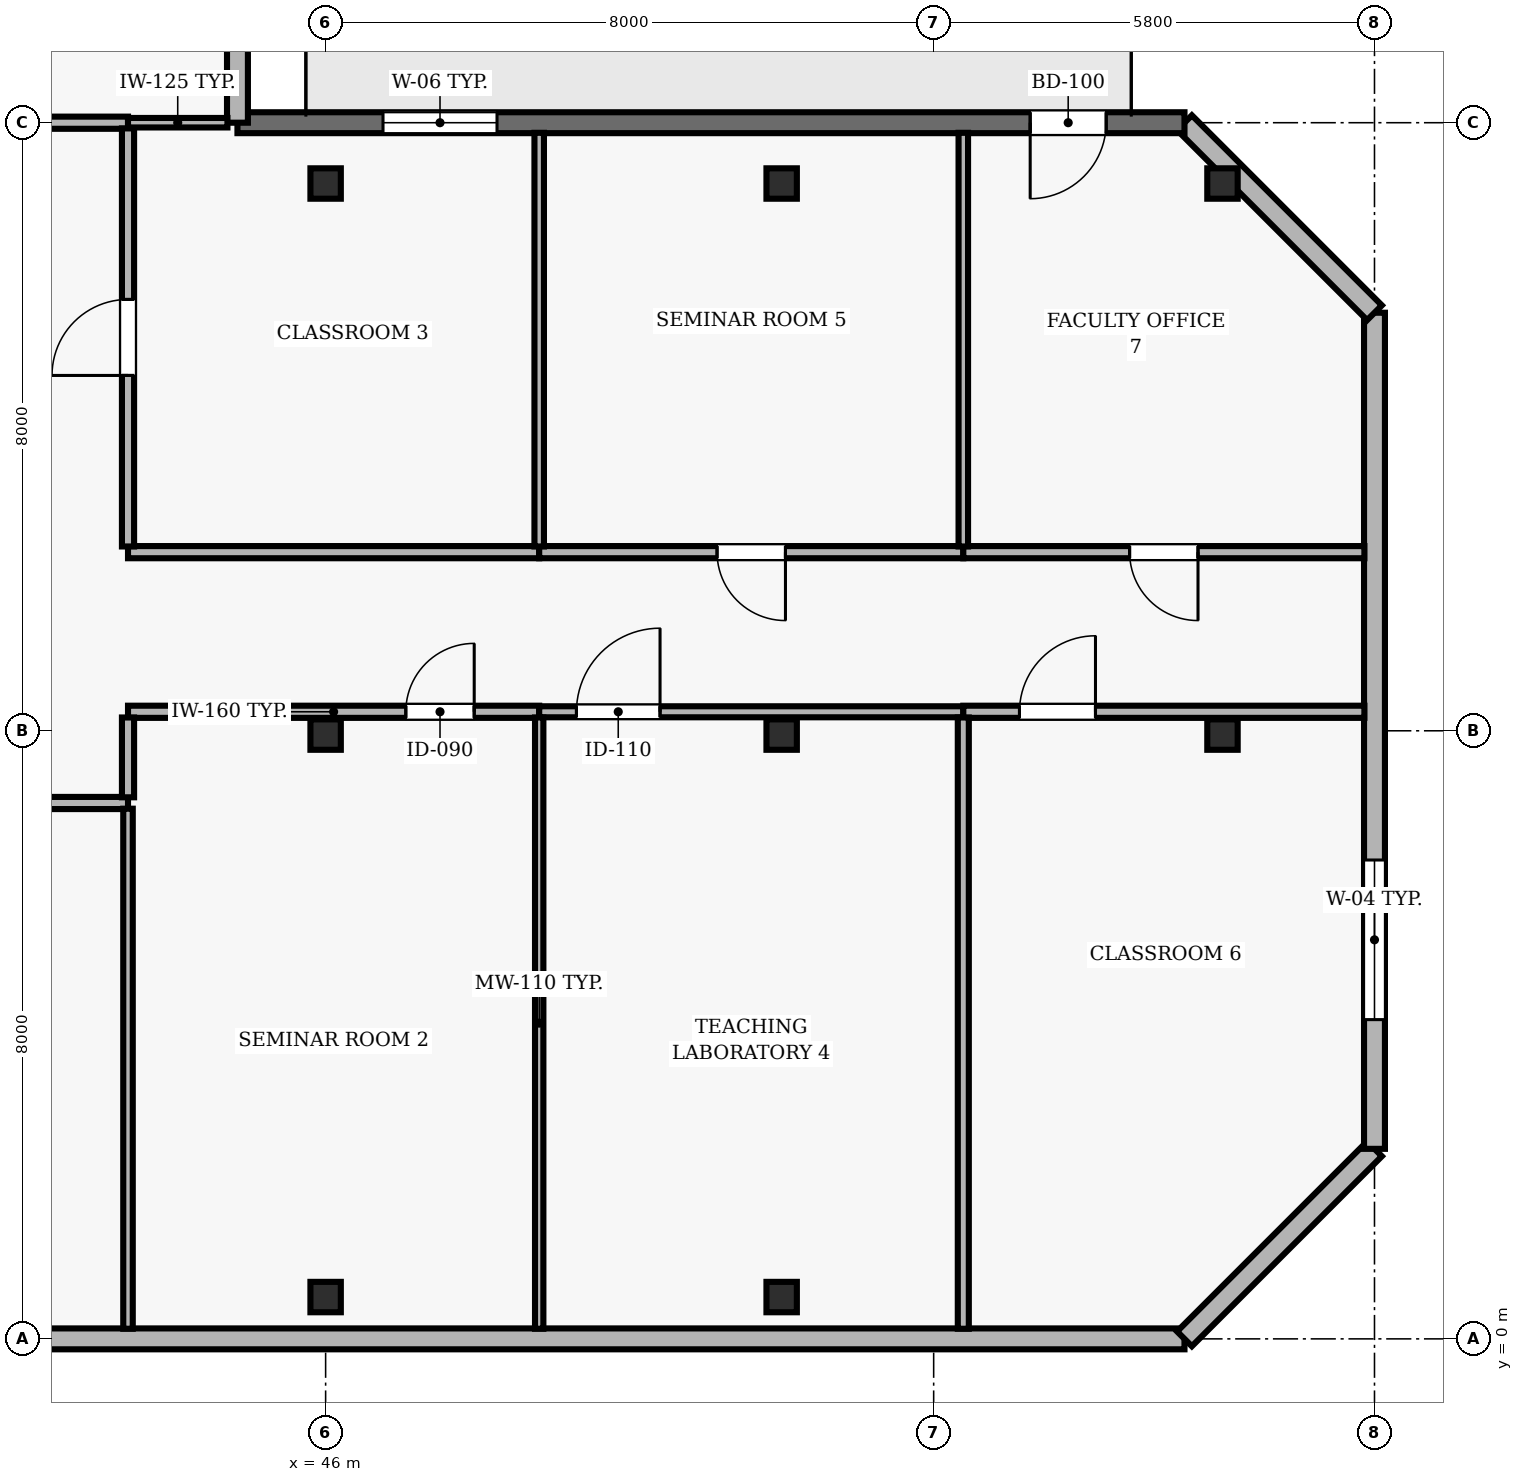
"""IFC4 building model, lengths in metres.
Left out: names, types, materials, properties, quantities, classifications, styles, units other than length and angle.
Written with IfcOpenShell. Run it as: python <this file> out.ifc"""

import sys

from ifc_helpers import new_model, si_unit, direction, frame, frame_2d, origin, origin_2d, place, context, subcontext, project, spatial, rectangle, hollow_rectangle, extrude, element, fill, save


model = new_model("IFC4")
c1 = context("Model", 3, precision=1e-05, world=origin(), true_north=direction((0.0, 1.0)))
c2 = subcontext(c1, "Body", "Model", "MODEL_VIEW")
j1 = project(units=[si_unit("LENGTHUNIT", "METRE"), si_unit("PLANEANGLEUNIT", "RADIAN")], contexts=[c1])
p1 = place(None, origin())
s1 = spatial("IfcSite", under=j1, at=p1, CompositionType="ELEMENT")
p2 = place(p1, origin())
s2 = spatial("IfcBuilding", under=s1, at=p2, CompositionType="ELEMENT")
p3 = place(p2, frame((0.0, 0.0, 252.1)))
s3 = spatial("IfcBuildingStorey", under=s2, at=p3, CompositionType="ELEMENT", Elevation=252.1)
for number, where, z_axis, x_axis in (
    (1, (46.0, 0.55, 0.0), (0.0, 0.0, 1.0), (1.0, 0.0, 0.0)),
    (2, (46.0, 7.95, 0.0), (0.0, 0.0, 1.0), (1.0, 0.0, 0.0)),
    (3, (46.0, 15.2, 0.0), (0.0, 0.0, 1.0), (1.0, 0.0, 0.0)),
    (4, (52.0, 0.55, 0.0), (0.0, 0.0, 1.0), (1.0, 0.0, 0.0)),
    (5, (52.0, 7.95, 0.0), (0.0, 0.0, 1.0), (1.0, 0.0, 0.0)),
    (6, (52.0, 15.2, 0.0), (0.0, 0.0, 1.0), (1.0, 0.0, 0.0)),
    (7, (57.8, 7.95, 0.0), (0.0, 0.0, 1.0), (1.0, 0.0, 0.0)),
    (8, (57.8, 15.2, 0.0), (0.0, 0.0, 1.0), (1.0, 0.0, 0.0)),
):
    element("IfcColumn", number, at=place(p3, frame(where, z_axis=z_axis, x_axis=x_axis)), inside=s3, PredefinedType="COLUMN", context=c2, shape_type="SweptSolid", body=[
        extrude(hollow_rectangle(XDim=0.4, YDim=0.4, WallThickness=0.02, at=origin_2d()), origin(), (0.0, 0.0, 1.0), 3.9),
    ])
p4 = place(p3, frame((24.5, 0.0, 0.0), z_axis=(0.0, 0.0, 1.0), x_axis=(1.0, 0.0, 0.0)))
e9 = element("IfcWall", 9, at=p4, inside=s3, PredefinedType="SOLIDWALL", context=c2, shape_type="SweptSolid", body=[
    extrude(rectangle(XDim=32.8, YDim=0.275, at=frame_2d((16.4, 0.0))), origin(), (0.0, 0.0, 1.0), 3.69),
])
p5 = place(p4, frame((1.983, 0.0, 0.9)))
e10 = element("IfcOpeningElement", 10, at=p5, cuts=e9, PredefinedType="OPENING", context=c2, shape_type="SweptSolid", body=[
    extrude(rectangle(XDim=1.5, YDim=1.6, at=frame_2d((0.75, 0.8))), frame((0.0, 0.147, 0.0), z_axis=(0.0, -1.0, 0.0), x_axis=(1.0, 0.0, 0.0)), (0.0, 0.0, 1.0), 0.295),
])
p6 = place(p4, frame((8.35, 0.0, 0.9)))
e11 = element("IfcOpeningElement", 11, at=p6, cuts=e9, PredefinedType="OPENING", context=c2, shape_type="SweptSolid", body=[
    extrude(rectangle(XDim=1.5, YDim=1.6, at=frame_2d((0.75, 0.8))), frame((0.0, 0.147, 0.0), z_axis=(0.0, -1.0, 0.0), x_axis=(1.0, 0.0, 0.0)), (0.0, 0.0, 1.0), 0.295),
])
p7 = place(p3, frame((57.3, 0.0, 0.0), z_axis=(0.0, 0.0, 1.0), x_axis=(0.707106781187, 0.707106781187, 0.0)))
e12 = element("IfcWall", 12, at=p7, inside=s3, PredefinedType="SOLIDWALL", context=c2, shape_type="SweptSolid", body=[
    extrude(rectangle(XDim=3.536, YDim=0.275, at=frame_2d((1.768, 0.0))), origin(), (0.0, 0.0, 1.0), 3.69),
])
p8 = place(p3, frame((59.8, 2.5, 0.0), z_axis=(0.0, 0.0, 1.0), x_axis=(0.0, 1.0, 0.0)))
e13 = element("IfcWall", 13, at=p8, inside=s3, PredefinedType="SOLIDWALL", context=c2, shape_type="SweptSolid", body=[
    extrude(rectangle(XDim=11.0, YDim=0.275, at=frame_2d((5.5, 0.0))), origin(), (0.0, 0.0, 1.0), 3.69),
])
p9 = place(p8, frame((1.7, 0.0, 0.9)))
e14 = element("IfcOpeningElement", 14, at=p9, cuts=e13, PredefinedType="OPENING", context=c2, shape_type="SweptSolid", body=[
    extrude(rectangle(XDim=2.1, YDim=1.6, at=frame_2d((1.05, 0.8))), frame((0.0, 0.147, 0.0), z_axis=(0.0, -1.0, 0.0), x_axis=(1.0, 0.0, 0.0)), (0.0, 0.0, 1.0), 0.295),
])
p10 = place(p3, frame((59.8, 13.5, 0.0), z_axis=(0.0, 0.0, 1.0), x_axis=(-0.707106781187, 0.707106781187, 0.0)))
e15 = element("IfcWall", 15, at=p10, inside=s3, PredefinedType="SOLIDWALL", context=c2, shape_type="SweptSolid", body=[
    extrude(rectangle(XDim=3.536, YDim=0.275, at=frame_2d((1.768, 0.0))), origin(), (0.0, 0.0, 1.0), 3.69),
])
p11 = place(p3, frame((57.3, 16.0, 0.0), z_axis=(0.0, 0.0, 1.0), x_axis=(-1.0, 0.0, 0.0)))
e16 = element("IfcWall", 16, at=p11, inside=s3, PredefinedType="SOLIDWALL", context=c2, shape_type="SweptSolid", body=[
    extrude(rectangle(XDim=12.46, YDim=0.275, at=frame_2d((6.23, 0.0))), origin(), (0.0, 0.0, 1.0), 3.69),
])
p12 = place(p11, frame((1.03, 0.0, 0.0)))
e17 = element("IfcOpeningElement", 17, at=p12, cuts=e16, PredefinedType="OPENING", context=c2, shape_type="SweptSolid", body=[
    extrude(rectangle(XDim=1.0, YDim=2.2, at=frame_2d((0.5, 1.1))), frame((0.0, 0.147, 0.0), z_axis=(0.0, -1.0, 0.0), x_axis=(1.0, 0.0, 0.0)), (0.0, 0.0, 1.0), 0.295),
])
p13 = place(p11, frame((9.045, 0.0, 0.9)))
e18 = element("IfcOpeningElement", 18, at=p13, cuts=e16, PredefinedType="OPENING", context=c2, shape_type="SweptSolid", body=[
    extrude(rectangle(XDim=1.5, YDim=1.8, at=frame_2d((0.75, 0.9))), frame((0.0, 0.147, 0.0), z_axis=(0.0, -1.0, 0.0), x_axis=(1.0, 0.0, 0.0)), (0.0, 0.0, 1.0), 0.295),
])
p14 = place(p3, frame((44.84, 16.0, 0.0), z_axis=(0.0, 0.0, 1.0), x_axis=(0.0, 1.0, 0.0)))
e19 = element("IfcWall", 19, at=p14, inside=s3, PredefinedType="SOLIDWALL", context=c2, shape_type="SweptSolid", body=[
    extrude(rectangle(XDim=8.3, YDim=0.275, at=frame_2d((4.15, 0.0))), origin(), (0.0, 0.0, 1.0), 3.69),
])
p15 = place(p14, frame((3.25, 0.0, 0.9)))
e20 = element("IfcOpeningElement", 20, at=p15, cuts=e19, PredefinedType="OPENING", context=c2, shape_type="SweptSolid", body=[
    extrude(rectangle(XDim=1.8, YDim=1.8, at=frame_2d((0.9, 0.9))), frame((0.0, 0.147, 0.0), z_axis=(0.0, -1.0, 0.0), x_axis=(1.0, 0.0, 0.0)), (0.0, 0.0, 1.0), 0.295),
])
p16 = place(p3, frame((38.05, 7.05, 0.0), z_axis=(0.0, 0.0, 1.0), x_axis=(1.0, 0.0, 0.0)))
e21 = element("IfcWall", 21, at=p16, inside=s3, PredefinedType="PARTITIONING", context=c2, shape_type="SweptSolid", body=[
    extrude(rectangle(XDim=5.35, YDim=0.16, at=frame_2d((2.675, 0.0))), origin(), (0.0, 0.0, 1.0), 3.69),
])
p17 = place(p16, frame((2.175, 0.0, 0.0)))
e22 = element("IfcOpeningElement", 22, at=p17, cuts=e21, PredefinedType="OPENING", context=c2, shape_type="SweptSolid", body=[
    extrude(rectangle(XDim=1.0, YDim=2.1, at=frame_2d((0.5, 1.05))), frame((0.0, 0.09, 0.0), z_axis=(0.0, -1.0, 0.0), x_axis=(1.0, 0.0, 0.0)), (0.0, 0.0, 1.0), 0.18),
])
p18 = place(p3, frame((43.4, 8.25, 0.0), z_axis=(0.0, 0.0, 1.0), x_axis=(1.0, 0.0, 0.0)))
e23 = element("IfcWall", 23, at=p18, inside=s3, PredefinedType="PARTITIONING", context=c2, shape_type="SweptSolid", body=[
    extrude(rectangle(XDim=5.41, YDim=0.16, at=frame_2d((2.705, 0.0))), origin(), (0.0, 0.0, 1.0), 3.227),
])
p19 = place(p18, frame((3.655, 0.0, 0.0)))
e24 = element("IfcOpeningElement", 24, at=p19, cuts=e23, PredefinedType="OPENING", context=c2, shape_type="SweptSolid", body=[
    extrude(rectangle(XDim=0.9, YDim=2.1, at=frame_2d((0.45, 1.05))), frame((0.0, 0.09, 0.0), z_axis=(0.0, -1.0, 0.0), x_axis=(1.0, 0.0, 0.0)), (0.0, 0.0, 1.0), 0.18),
])
p20 = place(p3, frame((43.4, 16.0, 0.0), z_axis=(0.0, 0.0, 1.0), x_axis=(-1.0, 0.0, 0.0)))
e25 = element("IfcWall", 25, at=p20, inside=s3, PredefinedType="PARTITIONING", context=c2, shape_type="SweptSolid", body=[
    extrude(rectangle(XDim=5.35, YDim=0.16, at=frame_2d((2.675, 0.0))), origin(), (0.0, 0.0, 1.0), 3.39),
])
p21 = place(p20, frame((2.225, 0.0, 0.0)))
e26 = element("IfcOpeningElement", 26, at=p21, cuts=e25, PredefinedType="OPENING", context=c2, shape_type="SweptSolid", body=[
    extrude(rectangle(XDim=0.9, YDim=2.1, at=frame_2d((0.45, 1.05))), frame((0.0, 0.09, 0.0), z_axis=(0.0, -1.0, 0.0), x_axis=(1.0, 0.0, 0.0)), (0.0, 0.0, 1.0), 0.18),
])
p22 = place(p3, frame((43.4, 16.0, 0.0), z_axis=(0.0, 0.0, 1.0), x_axis=(1.0, 0.0, 0.0)))
e27 = element("IfcWall", 27, at=p22, inside=s3, PredefinedType="PARTITIONING", context=c2, shape_type="SweptSolid", body=[
    extrude(rectangle(XDim=1.308, YDim=0.125, at=frame_2d((0.654, 0.0))), origin(), (0.0, 0.0, 1.0), 3.39),
])
p23 = place(p3, frame((48.81, 8.25, 0.0), z_axis=(0.0, 0.0, 1.0), x_axis=(1.0, 0.0, 0.0)))
e28 = element("IfcWall", 28, at=p23, inside=s3, PredefinedType="PARTITIONING", context=c2, shape_type="SweptSolid", body=[
    extrude(rectangle(XDim=5.58, YDim=0.145, at=frame_2d((2.79, 0.0))), origin(), (0.0, 0.0, 1.0), 3.227),
])
p24 = place(p23, frame((0.49, 0.0, 0.0)))
e29 = element("IfcOpeningElement", 29, at=p24, cuts=e28, PredefinedType="OPENING", context=c2, shape_type="SweptSolid", body=[
    extrude(rectangle(XDim=1.1, YDim=2.15, at=frame_2d((0.55, 1.075))), frame((0.0, 0.083, 0.0), z_axis=(0.0, -1.0, 0.0), x_axis=(1.0, 0.0, 0.0)), (0.0, 0.0, 1.0), 0.165),
])
p25 = place(p3, frame((48.81, 10.35, 0.0), z_axis=(0.0, 0.0, 1.0), x_axis=(-1.0, 0.0, 0.0)))
e30 = element("IfcWall", 30, at=p25, inside=s3, PredefinedType="PARTITIONING", context=c2, shape_type="SweptSolid", body=[
    extrude(rectangle(XDim=5.41, YDim=0.16, at=frame_2d((2.705, 0.0))), origin(), (0.0, 0.0, 1.0), 3.424),
])
p26 = place(p3, frame((54.39, 8.25, 0.0), z_axis=(0.0, 0.0, 1.0), x_axis=(1.0, 0.0, 0.0)))
e31 = element("IfcWall", 31, at=p26, inside=s3, PredefinedType="PARTITIONING", context=c2, shape_type="SweptSolid", body=[
    extrude(rectangle(XDim=5.277, YDim=0.16, at=frame_2d((2.639, 0.0))), origin(), (0.0, 0.0, 1.0), 3.227),
])
p27 = place(p26, frame((0.739, 0.0, 0.0)))
e32 = element("IfcOpeningElement", 32, at=p27, cuts=e31, PredefinedType="OPENING", context=c2, shape_type="SweptSolid", body=[
    extrude(rectangle(XDim=1.0, YDim=2.1, at=frame_2d((0.5, 1.05))), frame((0.0, 0.09, 0.0), z_axis=(0.0, -1.0, 0.0), x_axis=(1.0, 0.0, 0.0)), (0.0, 0.0, 1.0), 0.18),
])
p28 = place(p3, frame((54.39, 10.35, 0.0), z_axis=(0.0, 0.0, 1.0), x_axis=(-1.0, 0.0, 0.0)))
e33 = element("IfcWall", 33, at=p28, inside=s3, PredefinedType="PARTITIONING", context=c2, shape_type="SweptSolid", body=[
    extrude(rectangle(XDim=5.58, YDim=0.16, at=frame_2d((2.79, 0.0))), origin(), (0.0, 0.0, 1.0), 3.424),
])
p29 = place(p28, frame((2.34, 0.0, 0.0)))
e34 = element("IfcOpeningElement", 34, at=p29, cuts=e33, PredefinedType="OPENING", context=c2, shape_type="SweptSolid", body=[
    extrude(rectangle(XDim=0.9, YDim=2.1, at=frame_2d((0.45, 1.05))), frame((0.0, 0.09, 0.0), z_axis=(0.0, -1.0, 0.0), x_axis=(1.0, 0.0, 0.0)), (0.0, 0.0, 1.0), 0.18),
])
p30 = place(p3, frame((59.667, 10.35, 0.0), z_axis=(0.0, 0.0, 1.0), x_axis=(-1.0, 0.0, 0.0)))
e35 = element("IfcWall", 35, at=p30, inside=s3, PredefinedType="PARTITIONING", context=c2, shape_type="SweptSolid", body=[
    extrude(rectangle(XDim=5.277, YDim=0.16, at=frame_2d((2.639, 0.0))), origin(), (0.0, 0.0, 1.0), 3.424),
])
p31 = place(p30, frame((2.189, 0.0, 0.0)))
e36 = element("IfcOpeningElement", 36, at=p31, cuts=e35, PredefinedType="OPENING", context=c2, shape_type="SweptSolid", body=[
    extrude(rectangle(XDim=0.9, YDim=2.1, at=frame_2d((0.45, 1.05))), frame((0.0, 0.09, 0.0), z_axis=(0.0, -1.0, 0.0), x_axis=(1.0, 0.0, 0.0)), (0.0, 0.0, 1.0), 0.18),
])
p32 = place(p3, frame((43.4, 0.133, 0.0), z_axis=(0.0, 0.0, 1.0), x_axis=(0.0, 1.0, 0.0)))
e37 = element("IfcWall", 37, at=p32, inside=s3, PredefinedType="PARTITIONING", context=c2, shape_type="SweptSolid", body=[
    extrude(rectangle(XDim=6.842, YDim=0.125, at=frame_2d((3.421, 0.0))), origin(), (0.0, 0.0, 1.0), 3.69),
])
p33 = place(p3, frame((43.4, 7.125, 0.0), z_axis=(0.0, 0.0, 1.0), x_axis=(0.0, 1.0, 0.0)))
e38 = element("IfcWall", 38, at=p33, inside=s3, PredefinedType="PARTITIONING", context=c2, shape_type="SweptSolid", body=[
    extrude(rectangle(XDim=1.05, YDim=0.16, at=frame_2d((0.525, 0.0))), origin(), (0.0, 0.0, 1.0), 3.69),
])
p34 = place(p3, frame((43.4, 10.425, 0.0), z_axis=(0.0, 0.0, 1.0), x_axis=(0.0, 1.0, 0.0)))
e39 = element("IfcWall", 39, at=p34, inside=s3, PredefinedType="PARTITIONING", context=c2, shape_type="SweptSolid", body=[
    extrude(rectangle(XDim=5.5, YDim=0.16, at=frame_2d((2.75, 0.0))), origin(), (0.0, 0.0, 1.0), 3.69),
])
p35 = place(p34, frame((2.25, 0.0, 0.0)))
e40 = element("IfcOpeningElement", 40, at=p35, cuts=e39, PredefinedType="OPENING", context=c2, shape_type="SweptSolid", body=[
    extrude(rectangle(XDim=1.0, YDim=2.1, at=frame_2d((0.5, 1.05))), frame((0.0, 0.09, 0.0), z_axis=(0.0, -1.0, 0.0), x_axis=(1.0, 0.0, 0.0)), (0.0, 0.0, 1.0), 0.18),
])
p36 = place(p3, frame((48.81, 0.133, 0.0), z_axis=(0.0, 0.0, 1.0), x_axis=(0.0, 1.0, 0.0)))
e41 = element("IfcWall", 41, at=p36, inside=s3, PredefinedType="MOVABLE", context=c2, shape_type="SweptSolid", body=[
    extrude(rectangle(XDim=8.042, YDim=0.11, at=frame_2d((4.021, 0.0))), origin(), (0.0, 0.0, 1.0), 3.69),
])
p37 = place(p3, frame((48.81, 10.425, 0.0), z_axis=(0.0, 0.0, 1.0), x_axis=(0.0, 1.0, 0.0)))
e42 = element("IfcWall", 42, at=p37, inside=s3, PredefinedType="PARTITIONING", context=c2, shape_type="SweptSolid", body=[
    extrude(rectangle(XDim=5.442, YDim=0.125, at=frame_2d((2.721, 0.0))), origin(), (0.0, 0.0, 1.0), 3.69),
])
p38 = place(p3, frame((54.39, 0.133, 0.0), z_axis=(0.0, 0.0, 1.0), x_axis=(0.0, 1.0, 0.0)))
e43 = element("IfcWall", 43, at=p38, inside=s3, PredefinedType="PARTITIONING", context=c2, shape_type="SweptSolid", body=[
    extrude(rectangle(XDim=8.042, YDim=0.145, at=frame_2d((4.021, 0.0))), origin(), (0.0, 0.0, 1.0), 3.69),
])
p39 = place(p3, frame((54.39, 10.425, 0.0), z_axis=(0.0, 0.0, 1.0), x_axis=(0.0, 1.0, 0.0)))
e44 = element("IfcWall", 44, at=p39, inside=s3, PredefinedType="PARTITIONING", context=c2, shape_type="SweptSolid", body=[
    extrude(rectangle(XDim=5.442, YDim=0.125, at=frame_2d((2.721, 0.0))), origin(), (0.0, 0.0, 1.0), 3.69),
])
p40 = place(p9, origin())
e45 = element("IfcWindow", 45, at=p40, inside=s3, PartitioningType="SINGLE_PANEL", PredefinedType="WINDOW", context=c2, shape_type="SweptSolid", body=[
    extrude(rectangle(XDim=2.1, YDim=1.6, at=frame_2d((1.05, 0.8))), frame((0.0, 0.03, 0.0), z_axis=(0.0, -1.0, 0.0), x_axis=(1.0, 0.0, 0.0)), (0.0, 0.0, 1.0), 0.06),
])
fill(e14, e45)
p41 = place(p12, origin())
e46 = element("IfcDoor", 46, at=p41, inside=s3, OperationType="SINGLE_SWING_RIGHT", PredefinedType="DOOR", context=c2, shape_type="SweptSolid", body=[
    extrude(rectangle(XDim=1.0, YDim=2.2, at=frame_2d((0.5, 1.1))), frame((0.0, 0.025, 0.0), z_axis=(0.0, -1.0, 0.0), x_axis=(1.0, 0.0, 0.0)), (0.0, 0.0, 1.0), 0.05),
])
fill(e17, e46)
p42 = place(p13, origin())
e47 = element("IfcWindow", 47, at=p42, inside=s3, PartitioningType="SINGLE_PANEL", PredefinedType="WINDOW", context=c2, shape_type="SweptSolid", body=[
    extrude(rectangle(XDim=1.5, YDim=1.8, at=frame_2d((0.75, 0.9))), frame((0.0, 0.03, 0.0), z_axis=(0.0, -1.0, 0.0), x_axis=(1.0, 0.0, 0.0)), (0.0, 0.0, 1.0), 0.06),
])
fill(e18, e47)
p43 = place(p19, origin())
e48 = element("IfcDoor", 48, at=p43, inside=s3, OperationType="SINGLE_SWING_RIGHT", PredefinedType="DOOR", context=c2, shape_type="SweptSolid", body=[
    extrude(rectangle(XDim=0.9, YDim=2.1, at=frame_2d((0.45, 1.05))), frame((0.0, 0.025, 0.0), z_axis=(0.0, -1.0, 0.0), x_axis=(1.0, 0.0, 0.0)), (0.0, 0.0, 1.0), 0.05),
])
fill(e24, e48)
p44 = place(p35, origin())
e49 = element("IfcDoor", 49, at=p44, inside=s3, OperationType="SINGLE_SWING_LEFT", PredefinedType="DOOR", context=c2, shape_type="SweptSolid", body=[
    extrude(rectangle(XDim=1.0, YDim=2.1, at=frame_2d((0.5, 1.05))), frame((0.0, 0.025, 0.0), z_axis=(0.0, -1.0, 0.0), x_axis=(1.0, 0.0, 0.0)), (0.0, 0.0, 1.0), 0.05),
])
fill(e40, e49)
p45 = place(p24, origin())
e50 = element("IfcDoor", 50, at=p45, inside=s3, OperationType="SINGLE_SWING_RIGHT", PredefinedType="DOOR", context=c2, shape_type="SweptSolid", body=[
    extrude(rectangle(XDim=1.1, YDim=2.15, at=frame_2d((0.55, 1.075))), frame((0.0, 0.025, 0.0), z_axis=(0.0, -1.0, 0.0), x_axis=(1.0, 0.0, 0.0)), (0.0, 0.0, 1.0), 0.05),
])
fill(e29, e50)
p46 = place(p29, origin())
e51 = element("IfcDoor", 51, at=p46, inside=s3, OperationType="SINGLE_SWING_LEFT", PredefinedType="DOOR", context=c2, shape_type="SweptSolid", body=[
    extrude(rectangle(XDim=0.9, YDim=2.1, at=frame_2d((0.45, 1.05))), frame((0.0, 0.025, 0.0), z_axis=(0.0, -1.0, 0.0), x_axis=(1.0, 0.0, 0.0)), (0.0, 0.0, 1.0), 0.05),
])
fill(e34, e51)
p47 = place(p27, origin())
e52 = element("IfcDoor", 52, at=p47, inside=s3, OperationType="SINGLE_SWING_RIGHT", PredefinedType="DOOR", context=c2, shape_type="SweptSolid", body=[
    extrude(rectangle(XDim=1.0, YDim=2.1, at=frame_2d((0.5, 1.05))), frame((0.0, 0.025, 0.0), z_axis=(0.0, -1.0, 0.0), x_axis=(1.0, 0.0, 0.0)), (0.0, 0.0, 1.0), 0.05),
])
fill(e32, e52)
p48 = place(p31, origin())
e53 = element("IfcDoor", 53, at=p48, inside=s3, OperationType="SINGLE_SWING_LEFT", PredefinedType="DOOR", context=c2, shape_type="SweptSolid", body=[
    extrude(rectangle(XDim=0.9, YDim=2.1, at=frame_2d((0.45, 1.05))), frame((0.0, 0.025, 0.0), z_axis=(0.0, -1.0, 0.0), x_axis=(1.0, 0.0, 0.0)), (0.0, 0.0, 1.0), 0.05),
])
fill(e36, e53)
save(model, sys.argv[1])
